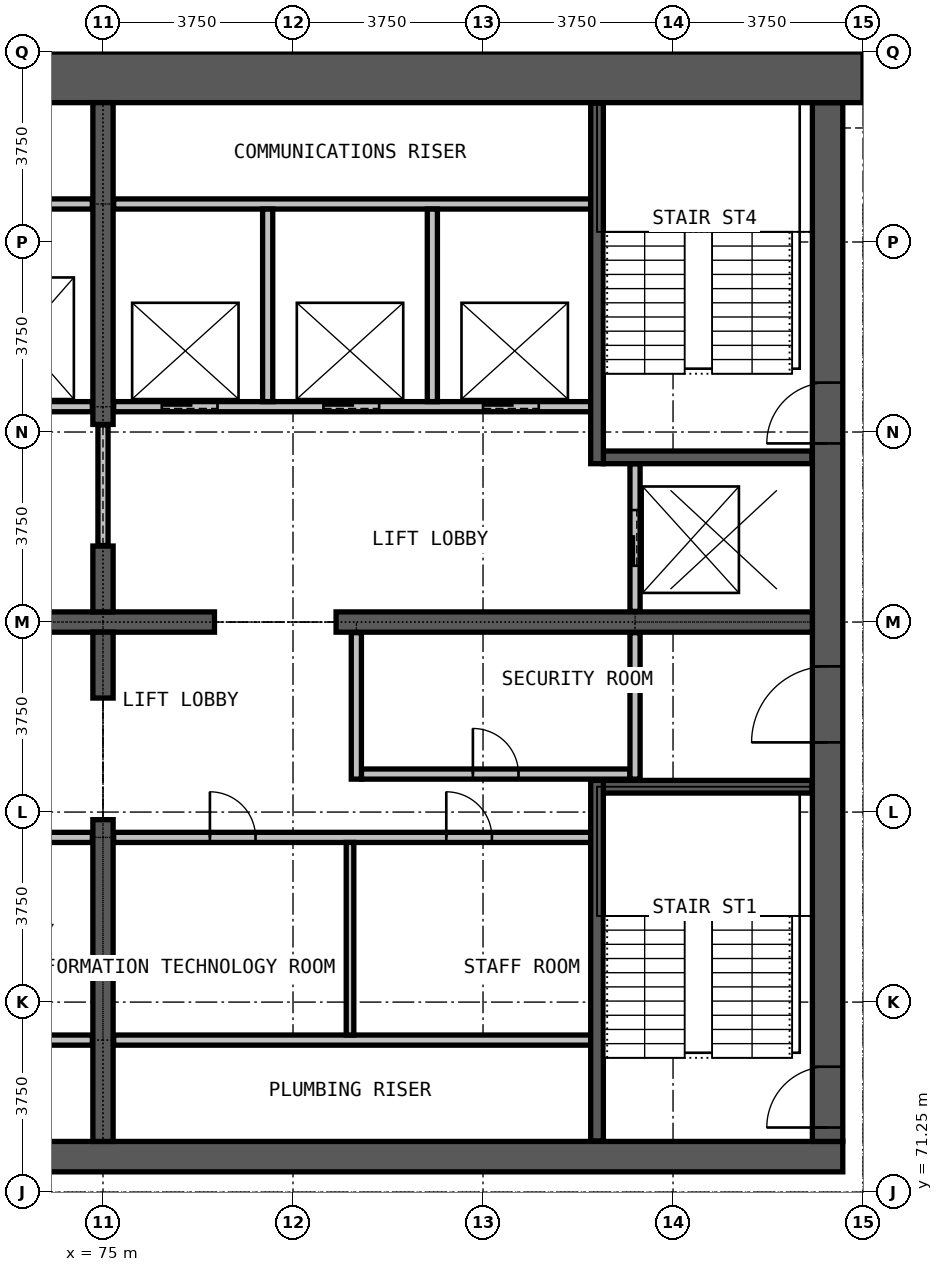
"""IFC4 building model, lengths in metres.
Left out: names, types, materials, properties, quantities, classifications, styles, units other than length and angle.
Written with IfcOpenShell. Run it as: python <this file> out.ifc"""

import sys

from ifc_helpers import new_model, si_unit, direction, frame, frame_2d, origin, place, context, subcontext, project, spatial, rectangle, extrude, element, fill, save


model = new_model("IFC4")
c1 = context("Model", 3, precision=1e-05, world=origin(), true_north=direction((0.0, 1.0)))
c2 = subcontext(c1, "Body", "Model", "MODEL_VIEW")
j1 = project(units=[si_unit("LENGTHUNIT", "METRE"), si_unit("PLANEANGLEUNIT", "RADIAN")], contexts=[c1])
p1 = place(None, origin())
s1 = spatial("IfcSite", under=j1, at=p1, CompositionType="ELEMENT")
p2 = place(p1, origin())
s2 = spatial("IfcBuilding", under=s1, at=p2, CompositionType="ELEMENT")
p3 = place(p2, frame((0.0, 0.0, 235.5)))
s3 = spatial("IfcBuildingStorey", under=s2, at=p3, CompositionType="ELEMENT", Elevation=235.5)
p4 = place(p3, frame((60.4, 71.95, 0.0), z_axis=(0.0, 0.0, 1.0), x_axis=(1.0, 0.0, 0.0)))
e1 = element("IfcWall", 1, at=p4, inside=s3, PredefinedType="SHEAR", context=c2, shape_type="SweptSolid", body=[
    extrude(rectangle(XDim=29.2, YDim=0.6, at=frame_2d((14.6, 0.0))), origin(), (0.0, 0.0, 1.0), 3.6),
])
p5 = place(p3, frame((89.3, 72.25, 0.0), z_axis=(0.0, 0.0, 1.0), x_axis=(0.0, 1.0, 0.0)))
e2 = element("IfcWall", 2, at=p5, inside=s3, PredefinedType="SHEAR", context=c2, shape_type="SweptSolid", body=[
    extrude(rectangle(XDim=20.5, YDim=0.6, at=frame_2d((10.25, 0.0))), origin(), (0.0, 0.0, 1.0), 3.6),
])
p6 = place(p5, frame((0.275, 0.0, 0.0)))
e3 = element("IfcOpeningElement", 3, at=p6, cuts=e2, PredefinedType="OPENING", context=c2, shape_type="SweptSolid", body=[
    extrude(rectangle(XDim=1.2, YDim=2.2, at=frame_2d((0.6, 1.1))), frame((0.0, 0.31, 0.0), z_axis=(0.0, -1.0, 0.0), x_axis=(1.0, 0.0, 0.0)), (0.0, 0.0, 1.0), 0.62),
])
p7 = place(p5, frame((13.775, 0.0, 0.0)))
e4 = element("IfcOpeningElement", 4, at=p7, cuts=e2, PredefinedType="OPENING", context=c2, shape_type="SweptSolid", body=[
    extrude(rectangle(XDim=1.2, YDim=2.2, at=frame_2d((0.6, 1.1))), frame((0.0, 0.31, 0.0), z_axis=(0.0, -1.0, 0.0), x_axis=(1.0, 0.0, 0.0)), (0.0, 0.0, 1.0), 0.62),
])
p8 = place(p5, frame((7.875, 0.0, 0.0)))
e5 = element("IfcOpeningElement", 5, at=p8, cuts=e2, PredefinedType="OPENING", context=c2, shape_type="SweptSolid", body=[
    extrude(rectangle(XDim=1.5, YDim=2.2, at=frame_2d((0.75, 1.1))), frame((0.0, 0.31, 0.0), z_axis=(0.0, -1.0, 0.0), x_axis=(1.0, 0.0, 0.0)), (0.0, 0.0, 1.0), 0.62),
])
p9 = place(p3, frame((90.0, 93.25, 0.0), z_axis=(0.0, 0.0, 1.0), x_axis=(-1.0, 0.0, 0.0)))
e6 = element("IfcWall", 6, at=p9, inside=s3, PredefinedType="SHEAR", context=c2, shape_type="SweptSolid", body=[
    extrude(rectangle(XDim=30.0, YDim=1.0, at=frame_2d((15.0, 0.0))), origin(), (0.0, 0.0, 1.0), 3.6),
])
p10 = place(p3, frame((72.8, 82.5, 0.0), z_axis=(0.0, 0.0, 1.0), x_axis=(1.0, 0.0, 0.0)))
e7 = element("IfcWall", 7, at=p10, inside=s3, PredefinedType="SHEAR", context=c2, shape_type="SweptSolid", body=[
    extrude(rectangle(XDim=4.4, YDim=0.4, at=frame_2d((2.2, 0.0))), origin(), (0.0, 0.0, 1.0), 3.6),
])
p11 = place(p3, frame((79.6, 82.5, 0.0), z_axis=(0.0, 0.0, 1.0), x_axis=(1.0, 0.0, 0.0)))
e8 = element("IfcWall", 8, at=p11, inside=s3, PredefinedType="SHEAR", context=c2, shape_type="SweptSolid", body=[
    extrude(rectangle(XDim=9.4, YDim=0.4, at=frame_2d((4.7, 0.0))), origin(), (0.0, 0.0, 1.0), 3.6),
])
p12 = place(p3, frame((75.0, 72.25, 0.0), z_axis=(0.0, 0.0, 1.0), x_axis=(0.0, 1.0, 0.0)))
e9 = element("IfcWall", 9, at=p12, inside=s3, PredefinedType="SHEAR", context=c2, shape_type="SweptSolid", body=[
    extrude(rectangle(XDim=6.35, YDim=0.4, at=frame_2d((3.175, 0.0))), origin(), (0.0, 0.0, 1.0), 3.6),
])
for number, where, z_axis, x_axis in (
    (10, (75.0, 81.0, 0.0), (0.0, 0.0, 1.0), (0.0, 1.0, 0.0)),
    (11, (75.0, 82.7, 0.0), (0.0, 0.0, 1.0), (0.0, 1.0, 0.0)),
):
    element("IfcWall", number, at=place(p3, frame(where, z_axis=z_axis, x_axis=x_axis)), inside=s3, PredefinedType="SHEAR", context=c2, shape_type="SweptSolid", body=[
        extrude(rectangle(XDim=1.3, YDim=0.4, at=frame_2d((0.65, 0.0))), origin(), (0.0, 0.0, 1.0), 3.6),
    ])
p13 = place(p3, frame((75.0, 86.4, 0.0), z_axis=(0.0, 0.0, 1.0), x_axis=(0.0, 1.0, 0.0)))
e12 = element("IfcWall", 12, at=p13, inside=s3, PredefinedType="SHEAR", context=c2, shape_type="SweptSolid", body=[
    extrude(rectangle(XDim=6.35, YDim=0.4, at=frame_2d((3.175, 0.0))), origin(), (0.0, 0.0, 1.0), 3.6),
])
for number, where, z_axis, x_axis in (
    (13, (65.375, 74.25, 0.0), (0.0, 0.0, 1.0), (1.0, 0.0, 0.0)),
    (14, (75.21, 74.25, 0.0), (0.0, 0.0, 1.0), (1.0, 0.0, 0.0)),
):
    element("IfcWall", number, at=place(p3, frame(where, z_axis=z_axis, x_axis=x_axis)), inside=s3, PredefinedType="PARTITIONING", context=c2, shape_type="SweptSolid", body=[
        extrude(rectangle(XDim=9.415, YDim=0.2, at=frame_2d((4.708, 0.0))), origin(), (0.0, 0.0, 1.0), 3.3),
    ])
p14 = place(p3, frame((65.375, 78.25, 0.0), z_axis=(0.0, 0.0, 1.0), x_axis=(1.0, 0.0, 0.0)))
e15 = element("IfcWall", 15, at=p14, inside=s3, PredefinedType="PARTITIONING", context=c2, shape_type="SweptSolid", body=[
    extrude(rectangle(XDim=9.415, YDim=0.2, at=frame_2d((4.708, 0.0))), origin(), (0.0, 0.0, 1.0), 3.3),
])
p15 = place(p14, frame((1.0, 0.0, 0.0)))
e16 = element("IfcOpeningElement", 16, at=p15, cuts=e15, PredefinedType="OPENING", context=c2, shape_type="SweptSolid", body=[
    extrude(rectangle(XDim=0.9, YDim=2.2, at=frame_2d((0.45, 1.1))), frame((0.0, 0.11, 0.0), z_axis=(0.0, -1.0, 0.0), x_axis=(1.0, 0.0, 0.0)), (0.0, 0.0, 1.0), 0.22),
])
p16 = place(p14, frame((5.665, 0.0, 0.0)))
e17 = element("IfcOpeningElement", 17, at=p16, cuts=e15, PredefinedType="OPENING", context=c2, shape_type="SweptSolid", body=[
    extrude(rectangle(XDim=0.9, YDim=2.2, at=frame_2d((0.45, 1.1))), frame((0.0, 0.11, 0.0), z_axis=(0.0, -1.0, 0.0), x_axis=(1.0, 0.0, 0.0)), (0.0, 0.0, 1.0), 0.22),
])
p17 = place(p3, frame((75.21, 78.25, 0.0), z_axis=(0.0, 0.0, 1.0), x_axis=(1.0, 0.0, 0.0)))
e18 = element("IfcWall", 18, at=p17, inside=s3, PredefinedType="PARTITIONING", context=c2, shape_type="SweptSolid", body=[
    extrude(rectangle(XDim=9.415, YDim=0.2, at=frame_2d((4.708, 0.0))), origin(), (0.0, 0.0, 1.0), 3.3),
])
p18 = place(p17, frame((1.9, 0.0, 0.0)))
e19 = element("IfcOpeningElement", 19, at=p18, cuts=e18, PredefinedType="OPENING", context=c2, shape_type="SweptSolid", body=[
    extrude(rectangle(XDim=0.9, YDim=2.2, at=frame_2d((0.45, 1.1))), frame((0.0, 0.11, 0.0), z_axis=(0.0, -1.0, 0.0), x_axis=(1.0, 0.0, 0.0)), (0.0, 0.0, 1.0), 0.22),
])
p19 = place(p17, frame((6.565, 0.0, 0.0)))
e20 = element("IfcOpeningElement", 20, at=p19, cuts=e18, PredefinedType="OPENING", context=c2, shape_type="SweptSolid", body=[
    extrude(rectangle(XDim=0.9, YDim=2.2, at=frame_2d((0.45, 1.1))), frame((0.0, 0.11, 0.0), z_axis=(0.0, -1.0, 0.0), x_axis=(1.0, 0.0, 0.0)), (0.0, 0.0, 1.0), 0.22),
])
p20 = place(p3, frame((80.1, 79.5, 0.0), z_axis=(0.0, 0.0, 1.0), x_axis=(1.0, 0.0, 0.0)))
e21 = element("IfcWall", 21, at=p20, inside=s3, PredefinedType="PARTITIONING", context=c2, shape_type="SweptSolid", body=[
    extrude(rectangle(XDim=5.3, YDim=0.2, at=frame_2d((2.65, 0.0))), origin(), (0.0, 0.0, 1.0), 3.3),
])
p21 = place(p20, frame((2.2, 0.0, 0.0)))
e22 = element("IfcOpeningElement", 22, at=p21, cuts=e21, PredefinedType="OPENING", context=c2, shape_type="SweptSolid", body=[
    extrude(rectangle(XDim=0.9, YDim=2.2, at=frame_2d((0.45, 1.1))), frame((0.0, 0.11, 0.0), z_axis=(0.0, -1.0, 0.0), x_axis=(1.0, 0.0, 0.0)), (0.0, 0.0, 1.0), 0.22),
])
p22 = place(p3, frame((75.0, 84.01, 0.0), z_axis=(0.0, 0.0, 1.0), x_axis=(0.0, 1.0, 0.0)))
e23 = element("IfcWall", 23, at=p22, inside=s3, PredefinedType="PARTITIONING", context=c2, shape_type="SweptSolid", body=[
    extrude(rectangle(XDim=2.38, YDim=0.2, at=frame_2d((1.19, 0.0))), origin(), (0.0, 0.0, 1.0), 2.4),
])
for number, where, z_axis, x_axis in (
    (24, (80.0, 79.4, 0.0), (0.0, 0.0, 1.0), (0.0, 1.0, 0.0)),
    (25, (85.5, 79.4, 0.0), (0.0, 0.0, 1.0), (0.0, 1.0, 0.0)),
):
    element("IfcWall", number, at=place(p3, frame(where, z_axis=z_axis, x_axis=x_axis)), inside=s3, PredefinedType="PARTITIONING", context=c2, shape_type="SweptSolid", body=[
        extrude(rectangle(XDim=2.89, YDim=0.2, at=frame_2d((1.445, 0.0))), origin(), (0.0, 0.0, 1.0), 3.3),
    ])
p23 = place(p3, frame((79.875, 74.35, 0.0), z_axis=(0.0, 0.0, 1.0), x_axis=(0.0, 1.0, 0.0)))
e26 = element("IfcWall", 26, at=p23, inside=s3, PredefinedType="PARTITIONING", context=c2, shape_type="SweptSolid", body=[
    extrude(rectangle(XDim=3.8, YDim=0.15, at=frame_2d((1.9, 0.0))), origin(), (0.0, 0.0, 1.0), 3.3),
])
p24 = place(p3, frame((65.375, 86.75, 0.0), z_axis=(0.0, 0.0, 1.0), x_axis=(1.0, 0.0, 0.0)))
e27 = element("IfcWall", 27, at=p24, inside=s3, PredefinedType="PARTITIONING", context=c2, shape_type="SweptSolid", body=[
    extrude(rectangle(XDim=9.415, YDim=0.2, at=frame_2d((4.708, 0.0))), origin(), (0.0, 0.0, 1.0), 3.3),
])
p25 = place(p24, frame((1.0, 0.0, 0.0)))
e28 = element("IfcOpeningElement", 28, at=p25, cuts=e27, PredefinedType="OPENING", context=c2, shape_type="SweptSolid", body=[
    extrude(rectangle(XDim=1.1, YDim=2.2, at=frame_2d((0.55, 1.1))), frame((0.0, 0.11, 0.0), z_axis=(0.0, -1.0, 0.0), x_axis=(1.0, 0.0, 0.0)), (0.0, 0.0, 1.0), 0.22),
])
p26 = place(p24, frame((4.175, 0.0, 0.0)))
e29 = element("IfcOpeningElement", 29, at=p26, cuts=e27, PredefinedType="OPENING", context=c2, shape_type="SweptSolid", body=[
    extrude(rectangle(XDim=1.1, YDim=2.2, at=frame_2d((0.55, 1.1))), frame((0.0, 0.11, 0.0), z_axis=(0.0, -1.0, 0.0), x_axis=(1.0, 0.0, 0.0)), (0.0, 0.0, 1.0), 0.22),
])
p27 = place(p24, frame((7.325, 0.0, 0.0)))
e30 = element("IfcOpeningElement", 30, at=p27, cuts=e27, PredefinedType="OPENING", context=c2, shape_type="SweptSolid", body=[
    extrude(rectangle(XDim=1.1, YDim=2.2, at=frame_2d((0.55, 1.1))), frame((0.0, 0.11, 0.0), z_axis=(0.0, -1.0, 0.0), x_axis=(1.0, 0.0, 0.0)), (0.0, 0.0, 1.0), 0.22),
])
p28 = place(p3, frame((75.21, 86.75, 0.0), z_axis=(0.0, 0.0, 1.0), x_axis=(1.0, 0.0, 0.0)))
e31 = element("IfcWall", 31, at=p28, inside=s3, PredefinedType="PARTITIONING", context=c2, shape_type="SweptSolid", body=[
    extrude(rectangle(XDim=9.415, YDim=0.2, at=frame_2d((4.708, 0.0))), origin(), (0.0, 0.0, 1.0), 3.3),
])
p29 = place(p28, frame((0.95, 0.0, 0.0)))
e32 = element("IfcOpeningElement", 32, at=p29, cuts=e31, PredefinedType="OPENING", context=c2, shape_type="SweptSolid", body=[
    extrude(rectangle(XDim=1.1, YDim=2.2, at=frame_2d((0.55, 1.1))), frame((0.0, 0.11, 0.0), z_axis=(0.0, -1.0, 0.0), x_axis=(1.0, 0.0, 0.0)), (0.0, 0.0, 1.0), 0.22),
])
p30 = place(p28, frame((4.14, 0.0, 0.0)))
e33 = element("IfcOpeningElement", 33, at=p30, cuts=e31, PredefinedType="OPENING", context=c2, shape_type="SweptSolid", body=[
    extrude(rectangle(XDim=1.1, YDim=2.2, at=frame_2d((0.55, 1.1))), frame((0.0, 0.11, 0.0), z_axis=(0.0, -1.0, 0.0), x_axis=(1.0, 0.0, 0.0)), (0.0, 0.0, 1.0), 0.22),
])
p31 = place(p28, frame((7.29, 0.0, 0.0)))
e34 = element("IfcOpeningElement", 34, at=p31, cuts=e31, PredefinedType="OPENING", context=c2, shape_type="SweptSolid", body=[
    extrude(rectangle(XDim=1.1, YDim=2.2, at=frame_2d((0.55, 1.1))), frame((0.0, 0.11, 0.0), z_axis=(0.0, -1.0, 0.0), x_axis=(1.0, 0.0, 0.0)), (0.0, 0.0, 1.0), 0.22),
])
for number, where, z_axis, x_axis in (
    (35, (65.375, 90.75, 0.0), (0.0, 0.0, 1.0), (1.0, 0.0, 0.0)),
    (36, (75.21, 90.75, 0.0), (0.0, 0.0, 1.0), (1.0, 0.0, 0.0)),
):
    element("IfcWall", number, at=place(p3, frame(where, z_axis=z_axis, x_axis=x_axis)), inside=s3, PredefinedType="PARTITIONING", context=c2, shape_type="SweptSolid", body=[
        extrude(rectangle(XDim=9.415, YDim=0.2, at=frame_2d((4.708, 0.0))), origin(), (0.0, 0.0, 1.0), 3.3),
    ])
for number, where, z_axis, x_axis in (
    (37, (78.25, 86.85, 0.0), (0.0, 0.0, 1.0), (0.0, 1.0, 0.0)),
    (38, (81.5, 86.85, 0.0), (0.0, 0.0, 1.0), (0.0, 1.0, 0.0)),
):
    element("IfcWall", number, at=place(p3, frame(where, z_axis=z_axis, x_axis=x_axis)), inside=s3, PredefinedType="PARTITIONING", context=c2, shape_type="SweptSolid", body=[
        extrude(rectangle(XDim=3.8, YDim=0.2, at=frame_2d((1.9, 0.0))), origin(), (0.0, 0.0, 1.0), 3.3),
    ])
p32 = place(p3, frame((85.5, 82.71, 0.0), z_axis=(0.0, 0.0, 1.0), x_axis=(0.0, 1.0, 0.0)))
e39 = element("IfcWall", 39, at=p32, inside=s3, PredefinedType="PARTITIONING", context=c2, shape_type="SweptSolid", body=[
    extrude(rectangle(XDim=2.915, YDim=0.2, at=frame_2d((1.458, 0.0))), origin(), (0.0, 0.0, 1.0), 3.3),
])
p33 = place(p32, frame((0.9, 0.0, 0.0)))
e40 = element("IfcOpeningElement", 40, at=p33, cuts=e39, PredefinedType="OPENING", context=c2, shape_type="SweptSolid", body=[
    extrude(rectangle(XDim=1.1, YDim=2.2, at=frame_2d((0.55, 1.1))), frame((0.0, 0.11, 0.0), z_axis=(0.0, -1.0, 0.0), x_axis=(1.0, 0.0, 0.0)), (0.0, 0.0, 1.0), 0.22),
])
for number, where, z_axis, x_axis in (
    (41, (84.875, 79.25, 0.0), (0.0, 0.0, 1.0), (1.0, 0.0, 0.0)),
    (42, (84.875, 85.75, 0.0), (0.0, 0.0, 1.0), (1.0, 0.0, 0.0)),
):
    element("IfcWall", number, at=place(p3, frame(where, z_axis=z_axis, x_axis=x_axis)), inside=s3, PredefinedType="PARTITIONING", context=c2, shape_type="SweptSolid", body=[
        extrude(rectangle(XDim=4.115, YDim=0.25, at=frame_2d((2.058, 0.0))), origin(), (0.0, 0.0, 1.0), 3.3),
    ])
for number, where, z_axis, x_axis in (
    (43, (84.75, 72.26, 0.0), (0.0, 0.0, 1.0), (0.0, 1.0, 0.0)),
    (44, (84.75, 85.625, 0.0), (0.0, 0.0, 1.0), (0.0, 1.0, 0.0)),
):
    element("IfcWall", number, at=place(p3, frame(where, z_axis=z_axis, x_axis=x_axis)), inside=s3, PredefinedType="PARTITIONING", context=c2, shape_type="SweptSolid", body=[
        extrude(rectangle(XDim=7.115, YDim=0.25, at=frame_2d((3.558, 0.0))), origin(), (0.0, 0.0, 1.0), 3.3),
    ])
p34 = place(p29, origin())
e45 = element("IfcDoor", 45, at=p34, inside=s3, OperationType="DOUBLE_DOOR_SLIDING", PredefinedType="DOOR", context=c2, shape_type="SweptSolid", body=[
    extrude(rectangle(XDim=1.1, YDim=2.2, at=frame_2d((0.55, 1.1))), frame((0.0, 0.025, 0.0), z_axis=(0.0, -1.0, 0.0), x_axis=(1.0, 0.0, 0.0)), (0.0, 0.0, 1.0), 0.05),
])
fill(e32, e45)
p35 = place(p30, origin())
e46 = element("IfcDoor", 46, at=p35, inside=s3, OperationType="DOUBLE_DOOR_SLIDING", PredefinedType="DOOR", context=c2, shape_type="SweptSolid", body=[
    extrude(rectangle(XDim=1.1, YDim=2.2, at=frame_2d((0.55, 1.1))), frame((0.0, 0.025, 0.0), z_axis=(0.0, -1.0, 0.0), x_axis=(1.0, 0.0, 0.0)), (0.0, 0.0, 1.0), 0.05),
])
fill(e33, e46)
p36 = place(p31, origin())
e47 = element("IfcDoor", 47, at=p36, inside=s3, OperationType="DOUBLE_DOOR_SLIDING", PredefinedType="DOOR", context=c2, shape_type="SweptSolid", body=[
    extrude(rectangle(XDim=1.1, YDim=2.2, at=frame_2d((0.55, 1.1))), frame((0.0, 0.025, 0.0), z_axis=(0.0, -1.0, 0.0), x_axis=(1.0, 0.0, 0.0)), (0.0, 0.0, 1.0), 0.05),
])
fill(e34, e47)
p37 = place(p33, origin())
e48 = element("IfcDoor", 48, at=p37, inside=s3, OperationType="DOUBLE_DOOR_SLIDING", PredefinedType="DOOR", context=c2, shape_type="SweptSolid", body=[
    extrude(rectangle(XDim=1.1, YDim=2.2, at=frame_2d((0.55, 1.1))), frame((0.0, 0.025, 0.0), z_axis=(0.0, -1.0, 0.0), x_axis=(1.0, 0.0, 0.0)), (0.0, 0.0, 1.0), 0.05),
])
fill(e40, e48)
p38 = place(p6, origin())
e49 = element("IfcDoor", 49, at=p38, inside=s3, OperationType="SINGLE_SWING_LEFT", PredefinedType="DOOR", context=c2, shape_type="SweptSolid", body=[
    extrude(rectangle(XDim=1.2, YDim=2.2, at=frame_2d((0.6, 1.1))), frame((0.0, 0.025, 0.0), z_axis=(0.0, -1.0, 0.0), x_axis=(1.0, 0.0, 0.0)), (0.0, 0.0, 1.0), 0.05),
])
fill(e3, e49)
p39 = place(p7, origin())
e50 = element("IfcDoor", 50, at=p39, inside=s3, OperationType="SINGLE_SWING_LEFT", PredefinedType="DOOR", context=c2, shape_type="SweptSolid", body=[
    extrude(rectangle(XDim=1.2, YDim=2.2, at=frame_2d((0.6, 1.1))), frame((0.0, 0.025, 0.0), z_axis=(0.0, -1.0, 0.0), x_axis=(1.0, 0.0, 0.0)), (0.0, 0.0, 1.0), 0.05),
])
fill(e4, e50)
p40 = place(p8, origin())
e51 = element("IfcDoor", 51, at=p40, inside=s3, OperationType="DOUBLE_DOOR_SINGLE_SWING", PredefinedType="DOOR", context=c2, shape_type="SweptSolid", body=[
    extrude(rectangle(XDim=1.5, YDim=2.2, at=frame_2d((0.75, 1.1))), frame((0.0, 0.025, 0.0), z_axis=(0.0, -1.0, 0.0), x_axis=(1.0, 0.0, 0.0)), (0.0, 0.0, 1.0), 0.05),
])
fill(e5, e51)
p41 = place(p21, origin())
e52 = element("IfcDoor", 52, at=p41, inside=s3, OperationType="SINGLE_SWING_LEFT", PredefinedType="DOOR", context=c2, shape_type="SweptSolid", body=[
    extrude(rectangle(XDim=0.9, YDim=2.2, at=frame_2d((0.45, 1.1))), frame((0.0, 0.025, 0.0), z_axis=(0.0, -1.0, 0.0), x_axis=(1.0, 0.0, 0.0)), (0.0, 0.0, 1.0), 0.05),
])
fill(e22, e52)
p42 = place(p18, origin())
e53 = element("IfcDoor", 53, at=p42, inside=s3, OperationType="SINGLE_SWING_RIGHT", PredefinedType="DOOR", context=c2, shape_type="SweptSolid", body=[
    extrude(rectangle(XDim=0.9, YDim=2.2, at=frame_2d((0.45, 1.1))), frame((0.0, 0.025, 0.0), z_axis=(0.0, -1.0, 0.0), x_axis=(1.0, 0.0, 0.0)), (0.0, 0.0, 1.0), 0.05),
])
fill(e19, e53)
p43 = place(p19, origin())
e54 = element("IfcDoor", 54, at=p43, inside=s3, OperationType="SINGLE_SWING_LEFT", PredefinedType="DOOR", context=c2, shape_type="SweptSolid", body=[
    extrude(rectangle(XDim=0.9, YDim=2.2, at=frame_2d((0.45, 1.1))), frame((0.0, 0.025, 0.0), z_axis=(0.0, -1.0, 0.0), x_axis=(1.0, 0.0, 0.0)), (0.0, 0.0, 1.0), 0.05),
])
fill(e20, e54)
save(model, sys.argv[1])
